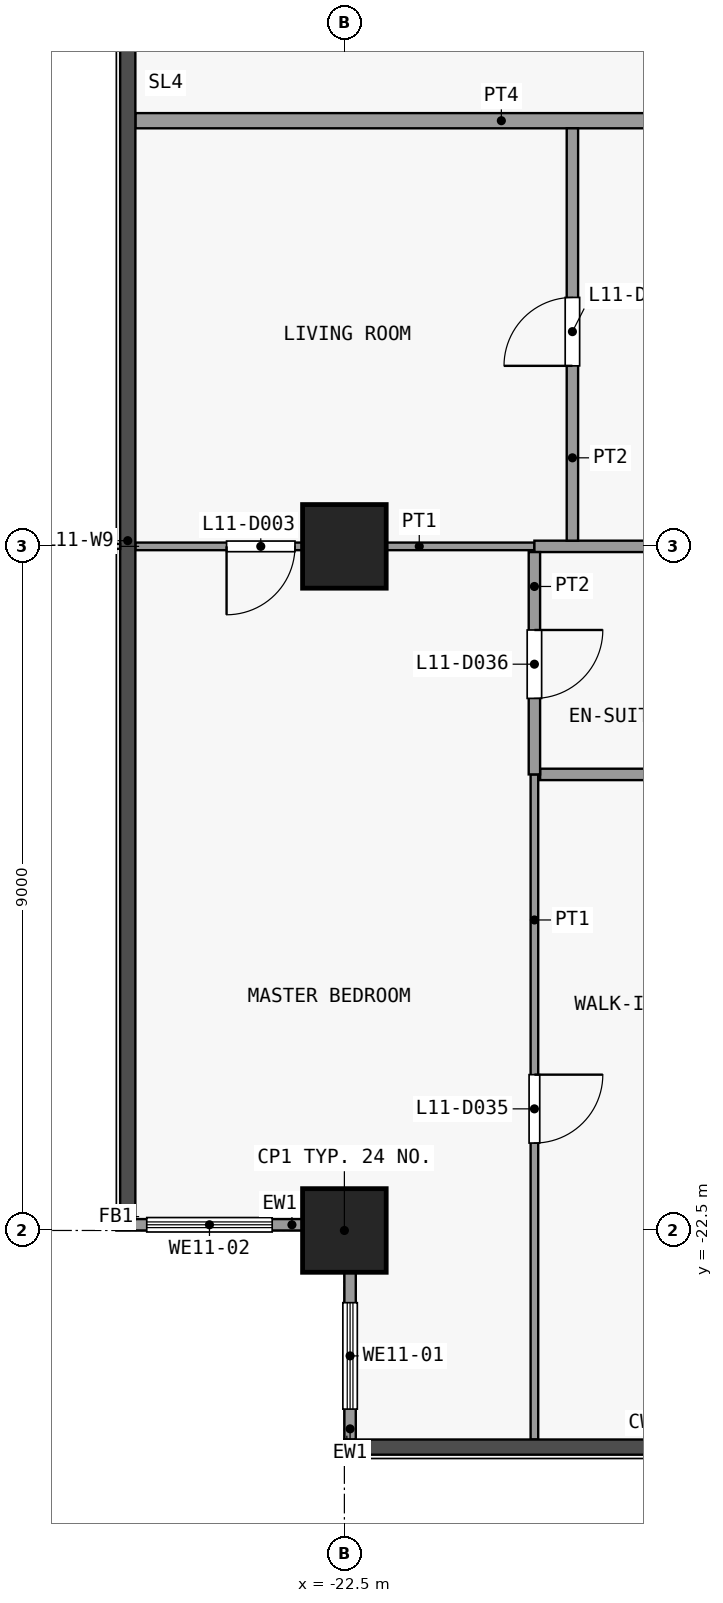
"""IFC4 building model, lengths in metres.
Left out: names, types, materials, properties, quantities, classifications, styles, units other than length and angle.
Written with IfcOpenShell. Run it as: python <this file> out.ifc"""

import sys

from ifc_helpers import new_model, si_unit, direction, frame, frame_2d, origin, origin_2d, place, context, subcontext, project, spatial, rectangle, extrude, element, fill, save


model = new_model("IFC4")
c1 = context("Model", 3, precision=1e-05, world=origin(), true_north=direction((0.0, 1.0)))
c2 = subcontext(c1, "Body", "Model", "MODEL_VIEW")
j1 = project(units=[si_unit("LENGTHUNIT", "METRE"), si_unit("PLANEANGLEUNIT", "RADIAN")], contexts=[c1])
p1 = place(None, origin())
s1 = spatial("IfcSite", under=j1, at=p1, CompositionType="ELEMENT")
p2 = place(p1, origin())
s2 = spatial("IfcBuilding", under=s1, at=p2, CompositionType="ELEMENT")
p3 = place(p2, frame((0.0, 0.0, 50.5)))
s3 = spatial("IfcBuildingStorey", under=s2, at=p3, CompositionType="ELEMENT", Elevation=50.5)
for number, where, z_axis, x_axis in (
    (1, (-22.5, -22.5, 0.0), (0.0, 0.0, 1.0), (1.0, 0.0, 0.0)),
    (2, (-22.5, -13.5, 0.0), (0.0, 0.0, 1.0), (1.0, 0.0, 0.0)),
):
    element("IfcColumn", number, at=place(p3, frame(where, z_axis=z_axis, x_axis=x_axis)), inside=s3, PredefinedType="COLUMN", context=c2, shape_type="SweptSolid", body=[
        extrude(rectangle(XDim=1.1, YDim=1.1, at=origin_2d()), origin(), (0.0, 0.0, 1.0), 3.6),
    ])
p4 = place(p3, frame((-22.425, -25.25, 0.0), z_axis=(0.0, 0.0, 1.0), x_axis=(0.0, 1.0, 0.0)))
e3 = element("IfcWall", 3, at=p4, inside=s3, PredefinedType="SOLIDWALL", context=c2, shape_type="SweptSolid", body=[
    extrude(rectangle(XDim=2.2, YDim=0.15, at=frame_2d((1.1, 0.0))), origin(), (0.0, 0.0, 1.0), 3.3),
])
p5 = place(p4, frame((0.4, 0.0, 0.9)))
e4 = element("IfcOpeningElement", 4, at=p5, cuts=e3, PredefinedType="OPENING", context=c2, shape_type="SweptSolid", body=[
    extrude(rectangle(XDim=1.4, YDim=2.4, at=frame_2d((0.7, 1.2))), frame((0.0, 0.085, 0.0), z_axis=(0.0, -1.0, 0.0), x_axis=(1.0, 0.0, 0.0)), (0.0, 0.0, 1.0), 0.17),
])
p6 = place(p3, frame((-23.05, -22.425, 0.0), z_axis=(0.0, 0.0, 1.0), x_axis=(-1.0, 0.0, 0.0)))
e5 = element("IfcWall", 5, at=p6, inside=s3, PredefinedType="SOLIDWALL", context=c2, shape_type="SweptSolid", body=[
    extrude(rectangle(XDim=2.45, YDim=0.15, at=frame_2d((1.225, 0.0))), origin(), (0.0, 0.0, 1.0), 3.3),
])
p7 = place(p6, frame((0.4, 0.0, 0.9)))
e6 = element("IfcOpeningElement", 6, at=p7, cuts=e5, PredefinedType="OPENING", context=c2, shape_type="SweptSolid", body=[
    extrude(rectangle(XDim=1.65, YDim=2.4, at=frame_2d((0.825, 1.2))), frame((0.0, 0.085, 0.0), z_axis=(0.0, -1.0, 0.0), x_axis=(1.0, 0.0, 0.0)), (0.0, 0.0, 1.0), 0.17),
])
p8 = place(p3, frame((-19.925, -16.5, 0.0), z_axis=(0.0, 0.0, 1.0), x_axis=(1.0, 0.0, 0.0)))
e7 = element("IfcWall", 7, at=p8, inside=s3, PredefinedType="PARTITIONING", context=c2, shape_type="SweptSolid", body=[
    extrude(rectangle(XDim=3.35, YDim=0.15, at=frame_2d((1.675, 0.0))), origin(), (0.0, 0.0, 1.0), 3.3),
])
p9 = place(p3, frame((-25.25, -13.5, 0.0), z_axis=(0.0, 0.0, 1.0), x_axis=(1.0, 0.0, 0.0)))
e8 = element("IfcWall", 8, at=p9, inside=s3, PredefinedType="PARTITIONING", context=c2, shape_type="SweptSolid", body=[
    extrude(rectangle(XDim=5.25, YDim=0.1, at=frame_2d((2.625, 0.0))), origin(), (0.0, 0.0, 1.0), 3.3),
])
p10 = place(p9, frame((1.2, 0.0, 0.0)))
e9 = element("IfcOpeningElement", 9, at=p10, cuts=e8, PredefinedType="OPENING", context=c2, shape_type="SweptSolid", body=[
    extrude(rectangle(XDim=0.9, YDim=2.1, at=frame_2d((0.45, 1.05))), frame((0.0, 0.06, 0.0), z_axis=(0.0, -1.0, 0.0), x_axis=(1.0, 0.0, 0.0)), (0.0, 0.0, 1.0), 0.12),
])
p11 = place(p3, frame((-20.0, -13.5, 0.0), z_axis=(0.0, 0.0, 1.0), x_axis=(1.0, 0.0, 0.0)))
e10 = element("IfcWall", 10, at=p11, inside=s3, PredefinedType="PARTITIONING", context=c2, shape_type="SweptSolid", body=[
    extrude(rectangle(XDim=3.425, YDim=0.15, at=frame_2d((1.712, 0.0))), origin(), (0.0, 0.0, 1.0), 3.3),
])
p12 = place(p3, frame((-25.25, -7.9, 0.0), z_axis=(0.0, 0.0, 1.0), x_axis=(1.0, 0.0, 0.0)))
e11 = element("IfcWall", 11, at=p12, inside=s3, PredefinedType="PARTITIONING", context=c2, shape_type="SweptSolid", body=[
    extrude(rectangle(XDim=11.75, YDim=0.2, at=frame_2d((5.875, 0.0))), origin(), (0.0, 0.0, 1.0), 3.3),
])
p13 = place(p12, frame((9.75, 0.0, 0.0)))
e12 = element("IfcOpeningElement", 12, at=p13, cuts=e11, PredefinedType="OPENING", context=c2, shape_type="SweptSolid", body=[
    extrude(rectangle(XDim=1.0, YDim=2.1, at=frame_2d((0.5, 1.05))), frame((0.0, 0.11, 0.0), z_axis=(0.0, -1.0, 0.0), x_axis=(1.0, 0.0, 0.0)), (0.0, 0.0, 1.0), 0.22),
])
p14 = place(p3, frame((-20.0, -25.25, 0.0), z_axis=(0.0, 0.0, 1.0), x_axis=(0.0, 1.0, 0.0)))
e13 = element("IfcWall", 13, at=p14, inside=s3, PredefinedType="PARTITIONING", context=c2, shape_type="SweptSolid", body=[
    extrude(rectangle(XDim=8.75, YDim=0.1, at=frame_2d((4.375, 0.0))), origin(), (0.0, 0.0, 1.0), 3.3),
])
p15 = place(p14, frame((3.9, 0.0, 0.0)))
e14 = element("IfcOpeningElement", 14, at=p15, cuts=e13, PredefinedType="OPENING", context=c2, shape_type="SweptSolid", body=[
    extrude(rectangle(XDim=0.9, YDim=2.1, at=frame_2d((0.45, 1.05))), frame((0.0, 0.06, 0.0), z_axis=(0.0, -1.0, 0.0), x_axis=(1.0, 0.0, 0.0)), (0.0, 0.0, 1.0), 0.12),
])
p16 = place(p3, frame((-20.0, -16.5, 0.0), z_axis=(0.0, 0.0, 1.0), x_axis=(0.0, 1.0, 0.0)))
e15 = element("IfcWall", 15, at=p16, inside=s3, PredefinedType="PARTITIONING", context=c2, shape_type="SweptSolid", body=[
    extrude(rectangle(XDim=2.925, YDim=0.15, at=frame_2d((1.462, 0.0))), origin(), (0.0, 0.0, 1.0), 3.3),
])
p17 = place(p16, frame((1.0, 0.0, 0.0)))
e16 = element("IfcOpeningElement", 16, at=p17, cuts=e15, PredefinedType="OPENING", context=c2, shape_type="SweptSolid", body=[
    extrude(rectangle(XDim=0.9, YDim=2.1, at=frame_2d((0.45, 1.05))), frame((0.0, 0.085, 0.0), z_axis=(0.0, -1.0, 0.0), x_axis=(1.0, 0.0, 0.0)), (0.0, 0.0, 1.0), 0.17),
])
p18 = place(p3, frame((-19.5, -13.425, 0.0), z_axis=(0.0, 0.0, 1.0), x_axis=(0.0, 1.0, 0.0)))
e17 = element("IfcWall", 17, at=p18, inside=s3, PredefinedType="PARTITIONING", context=c2, shape_type="SweptSolid", body=[
    extrude(rectangle(XDim=5.425, YDim=0.15, at=frame_2d((2.712, 0.0))), origin(), (0.0, 0.0, 1.0), 3.3),
])
p19 = place(p18, frame((2.3, 0.0, 0.0)))
e18 = element("IfcOpeningElement", 18, at=p19, cuts=e17, PredefinedType="OPENING", context=c2, shape_type="SweptSolid", body=[
    extrude(rectangle(XDim=0.9, YDim=2.1, at=frame_2d((0.45, 1.05))), frame((0.0, 0.085, 0.0), z_axis=(0.0, -1.0, 0.0), x_axis=(1.0, 0.0, 0.0)), (0.0, 0.0, 1.0), 0.17),
])
p20 = place(p5, origin())
e19 = element("IfcWindow", 19, at=p20, inside=s3, PartitioningType="SINGLE_PANEL", PredefinedType="WINDOW", context=c2, shape_type="SweptSolid", body=[
    extrude(rectangle(XDim=1.4, YDim=2.4, at=frame_2d((0.7, 1.2))), frame((0.0, 0.03, 0.0), z_axis=(0.0, -1.0, 0.0), x_axis=(1.0, 0.0, 0.0)), (0.0, 0.0, 1.0), 0.06),
])
fill(e4, e19)
p21 = place(p7, origin())
e20 = element("IfcWindow", 20, at=p21, inside=s3, PartitioningType="SINGLE_PANEL", PredefinedType="WINDOW", context=c2, shape_type="SweptSolid", body=[
    extrude(rectangle(XDim=1.65, YDim=2.4, at=frame_2d((0.825, 1.2))), frame((0.0, 0.03, 0.0), z_axis=(0.0, -1.0, 0.0), x_axis=(1.0, 0.0, 0.0)), (0.0, 0.0, 1.0), 0.06),
])
fill(e6, e20)
p22 = place(p10, origin())
e21 = element("IfcDoor", 21, at=p22, inside=s3, OperationType="SINGLE_SWING_LEFT", PredefinedType="DOOR", context=c2, shape_type="SweptSolid", body=[
    extrude(rectangle(XDim=0.9, YDim=2.1, at=frame_2d((0.45, 1.05))), frame((0.0, 0.025, 0.0), z_axis=(0.0, -1.0, 0.0), x_axis=(1.0, 0.0, 0.0)), (0.0, 0.0, 1.0), 0.05),
])
fill(e9, e21)
p23 = place(p15, origin())
e22 = element("IfcDoor", 22, at=p23, inside=s3, OperationType="SINGLE_SWING_RIGHT", PredefinedType="DOOR", context=c2, shape_type="SweptSolid", body=[
    extrude(rectangle(XDim=0.9, YDim=2.1, at=frame_2d((0.45, 1.05))), frame((0.0, 0.025, 0.0), z_axis=(0.0, -1.0, 0.0), x_axis=(1.0, 0.0, 0.0)), (0.0, 0.0, 1.0), 0.05),
])
fill(e14, e22)
p24 = place(p17, origin())
e23 = element("IfcDoor", 23, at=p24, inside=s3, OperationType="SINGLE_SWING_RIGHT", PredefinedType="DOOR", context=c2, shape_type="SweptSolid", body=[
    extrude(rectangle(XDim=0.9, YDim=2.1, at=frame_2d((0.45, 1.05))), frame((0.0, 0.025, 0.0), z_axis=(0.0, -1.0, 0.0), x_axis=(1.0, 0.0, 0.0)), (0.0, 0.0, 1.0), 0.05),
])
fill(e16, e23)
p25 = place(p19, origin())
e24 = element("IfcDoor", 24, at=p25, inside=s3, OperationType="SINGLE_SWING_RIGHT", PredefinedType="DOOR", context=c2, shape_type="SweptSolid", body=[
    extrude(rectangle(XDim=0.9, YDim=2.1, at=frame_2d((0.45, 1.05))), frame((0.0, 0.025, 0.0), z_axis=(0.0, -1.0, 0.0), x_axis=(1.0, 0.0, 0.0)), (0.0, 0.0, 1.0), 0.05),
])
fill(e18, e24)
save(model, sys.argv[1])
